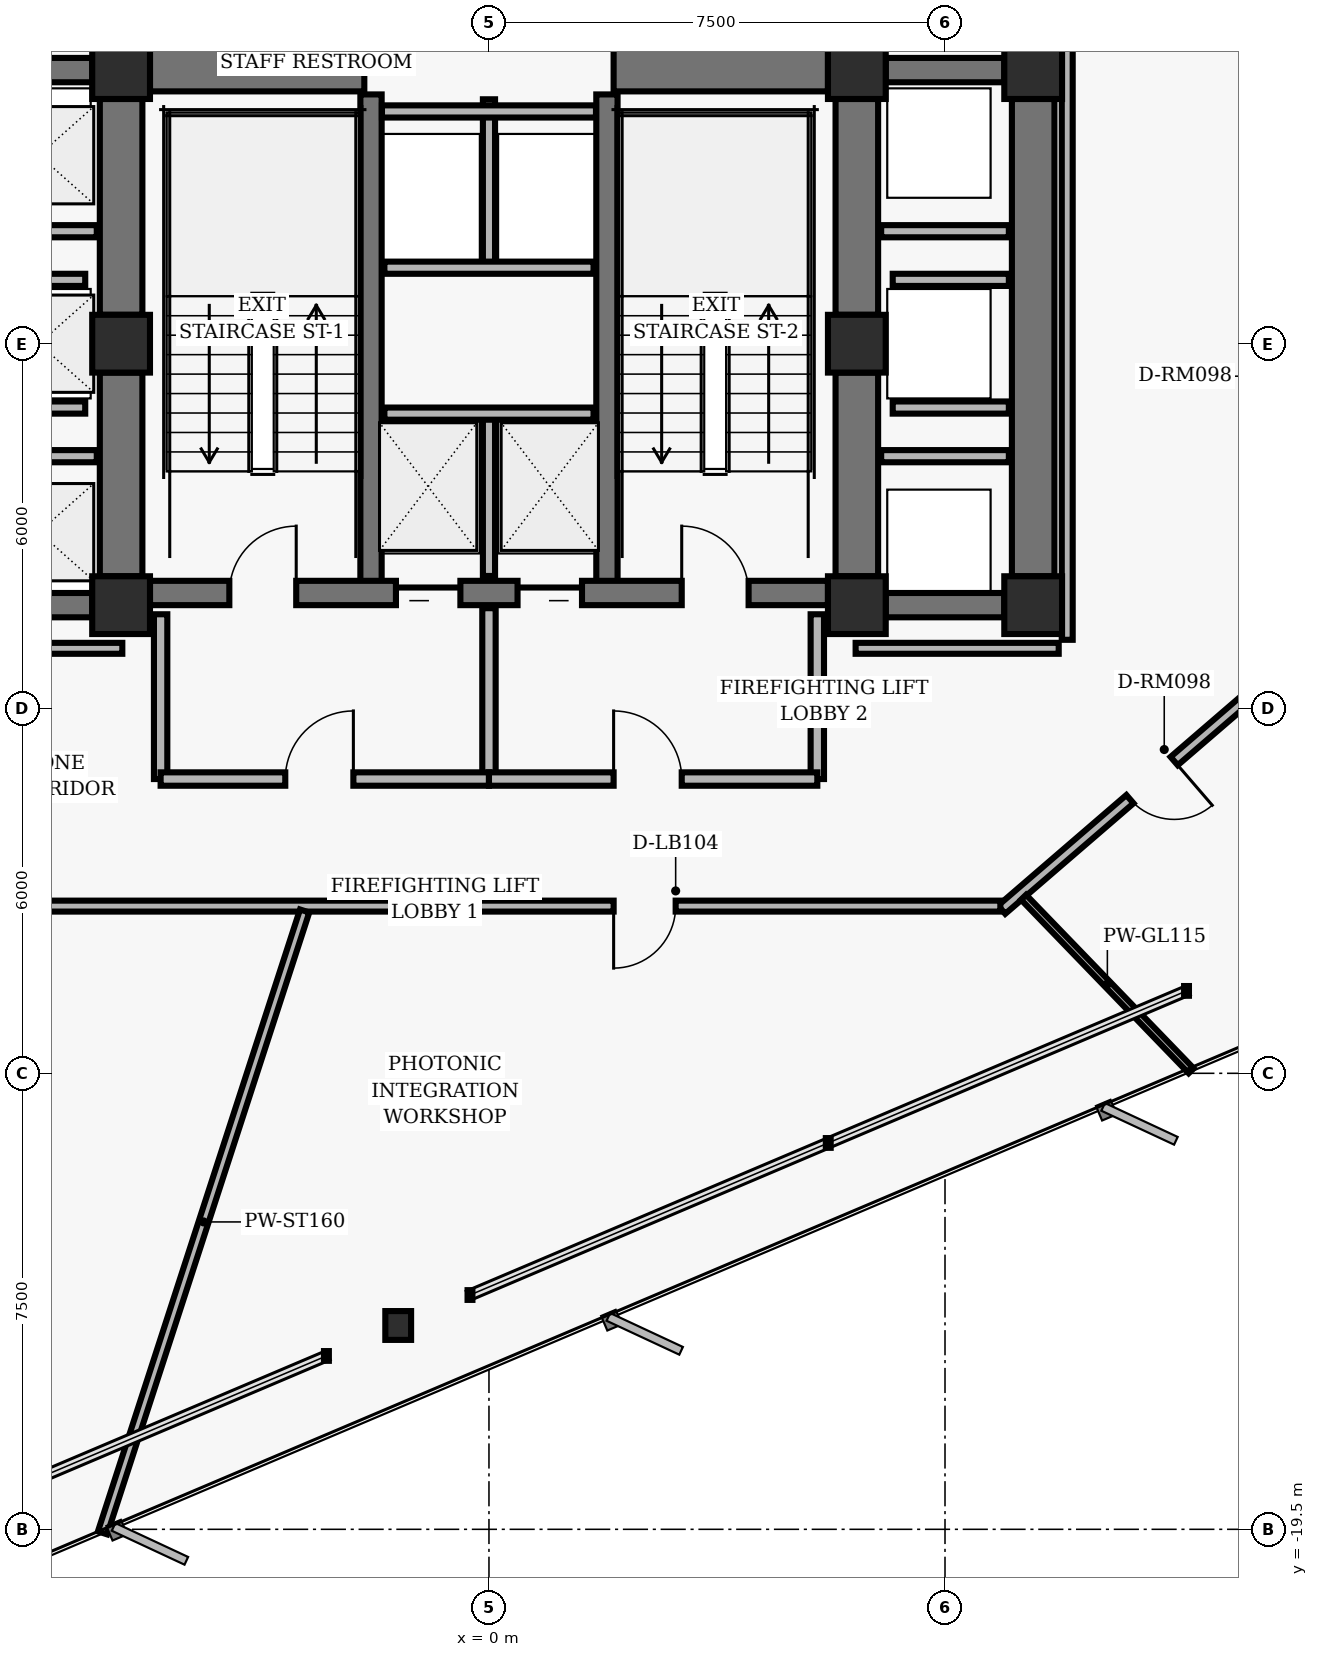
"""IFC4 building model, lengths in metres.
Left out: names, types, materials, properties, quantities, classifications, styles, units other than length and angle.
Written with IfcOpenShell. Run it as: python <this file> out.ifc"""

import sys

from ifc_helpers import new_model, si_unit, direction, frame, frame_2d, origin, origin_2d, place, context, subcontext, project, spatial, rectangle, hollow_rectangle, i_section, extrude, element, fill, save


model = new_model("IFC4")
c1 = context("Model", 3, precision=1e-05, world=origin(), true_north=direction((0.0, 1.0)))
c2 = subcontext(c1, "Body", "Model", "MODEL_VIEW")
j1 = project(units=[si_unit("LENGTHUNIT", "METRE"), si_unit("PLANEANGLEUNIT", "RADIAN")], contexts=[c1])
p1 = place(None, origin())
s1 = spatial("IfcSite", under=j1, at=p1, CompositionType="ELEMENT")
p2 = place(p1, origin())
s2 = spatial("IfcBuilding", under=s1, at=p2, CompositionType="ELEMENT")
p3 = place(p2, frame((0.0, 0.0, 56.32)))
s3 = spatial("IfcBuildingStorey", under=s2, at=p3, CompositionType="ELEMENT", Elevation=56.32)
for number, where, z_axis, x_axis in (
    (1, (-6.05, 4.5, 0.0), (0.0, 0.0, 1.0), (1.0, 0.0, 0.0)),
    (2, (6.05, 4.5, 0.0), (0.0, 0.0, 1.0), (1.0, 0.0, 0.0)),
    (3, (-6.05, 0.0, 0.0), (0.0, 0.0, 1.0), (1.0, 0.0, 0.0)),
    (4, (6.05, 0.0, 0.0), (0.0, 0.0, 1.0), (1.0, 0.0, 0.0)),
    (5, (-6.05, -4.3, 0.0), (0.0, 0.0, 1.0), (1.0, 0.0, 0.0)),
    (6, (6.05, -4.3, 0.0), (0.0, 0.0, 1.0), (1.0, 0.0, 0.0)),
    (7, (8.95, 4.5, 0.0), (0.0, 0.0, 1.0), (1.0, 0.0, 0.0)),
    (8, (8.95, -4.3, 0.0), (0.0, 0.0, 1.0), (1.0, 0.0, 0.0)),
):
    element("IfcColumn", number, at=place(p3, frame(where, z_axis=z_axis, x_axis=x_axis)), inside=s3, PredefinedType="COLUMN", context=c2, shape_type="SweptSolid", body=[
        extrude(hollow_rectangle(XDim=0.95, YDim=0.95, WallThickness=0.06, InnerFilletRadius=0.02, OuterFilletRadius=0.04, at=origin_2d()), origin(), (0.0, 0.0, 1.0), 3.36),
    ])
p4 = place(p3, frame((-6.05, 0.475, 0.0), z_axis=(0.0, 0.0, 1.0), x_axis=(0.0, 1.0, 0.0)))
e9 = element("IfcWall", 9, at=p4, inside=s3, PredefinedType="SHEAR", context=c2, shape_type="SweptSolid", body=[
    extrude(rectangle(XDim=3.55, YDim=0.7, at=frame_2d((1.775, 0.0))), origin(), (0.0, 0.0, 1.0), 3.098),
])
p5 = place(p3, frame((-6.05, -3.825, 0.0), z_axis=(0.0, 0.0, 1.0), x_axis=(0.0, 1.0, 0.0)))
e10 = element("IfcWall", 10, at=p5, inside=s3, PredefinedType="SHEAR", context=c2, shape_type="SweptSolid", body=[
    extrude(rectangle(XDim=3.35, YDim=0.7, at=frame_2d((1.675, 0.0))), origin(), (0.0, 0.0, 1.0), 3.098),
])
p6 = place(p3, frame((6.05, 0.475, 0.0), z_axis=(0.0, 0.0, 1.0), x_axis=(0.0, 1.0, 0.0)))
e11 = element("IfcWall", 11, at=p6, inside=s3, PredefinedType="SHEAR", context=c2, shape_type="SweptSolid", body=[
    extrude(rectangle(XDim=3.55, YDim=0.7, at=frame_2d((1.775, 0.0))), origin(), (0.0, 0.0, 1.0), 3.098),
])
p7 = place(p3, frame((6.05, -3.825, 0.0), z_axis=(0.0, 0.0, 1.0), x_axis=(0.0, 1.0, 0.0)))
e12 = element("IfcWall", 12, at=p7, inside=s3, PredefinedType="SHEAR", context=c2, shape_type="SweptSolid", body=[
    extrude(rectangle(XDim=3.35, YDim=0.7, at=frame_2d((1.675, 0.0))), origin(), (0.0, 0.0, 1.0), 3.098),
])
for number, where, z_axis, x_axis in (
    (13, (-1.94, -4.1, 0.0), (0.0, 0.0, 1.0), (0.0, 1.0, 0.0)),
    (14, (1.94, -4.1, 0.0), (0.0, 0.0, 1.0), (0.0, 1.0, 0.0)),
):
    element("IfcWall", number, at=place(p3, frame(where, z_axis=z_axis, x_axis=x_axis)), inside=s3, PredefinedType="SHEAR", context=c2, shape_type="SweptSolid", body=[
        extrude(rectangle(XDim=8.2, YDim=0.35, at=frame_2d((4.1, 0.0))), origin(), (0.0, 0.0, 1.0), 3.098),
    ])
p8 = place(p3, frame((-5.575, -4.1, 0.0), z_axis=(0.0, 0.0, 1.0), x_axis=(1.0, 0.0, 0.0)))
e15 = element("IfcWall", 15, at=p8, inside=s3, PredefinedType="SHEAR", context=c2, shape_type="SweptSolid", body=[
    extrude(rectangle(XDim=11.15, YDim=0.4, at=frame_2d((5.575, 0.0))), origin(), (0.0, 0.0, 1.0), 3.098),
])
p9 = place(p8, frame((1.305, 0.0, 0.0)))
e16 = element("IfcOpeningElement", 16, at=p9, cuts=e15, PredefinedType="OPENING", context=c2, shape_type="SweptSolid", body=[
    extrude(rectangle(XDim=1.1, YDim=2.04, at=frame_2d((0.55, 1.02))), frame((0.0, 0.21, 0.0), z_axis=(0.0, -1.0, 0.0), x_axis=(1.0, 0.0, 0.0)), (0.0, 0.0, 1.0), 0.42),
])
p10 = place(p8, frame((8.745, 0.0, 0.0)))
e17 = element("IfcOpeningElement", 17, at=p10, cuts=e15, PredefinedType="OPENING", context=c2, shape_type="SweptSolid", body=[
    extrude(rectangle(XDim=1.1, YDim=2.04, at=frame_2d((0.55, 1.02))), frame((0.0, 0.21, 0.0), z_axis=(0.0, -1.0, 0.0), x_axis=(1.0, 0.0, 0.0)), (0.0, 0.0, 1.0), 0.42),
])
p11 = place(p8, frame((4.045, 0.0, 0.0)))
e18 = element("IfcOpeningElement", 18, at=p11, cuts=e15, PredefinedType="OPENING", context=c2, shape_type="SweptSolid", body=[
    extrude(rectangle(XDim=1.06, YDim=2.04, at=frame_2d((0.53, 1.02))), frame((0.0, 0.21, 0.0), z_axis=(0.0, -1.0, 0.0), x_axis=(1.0, 0.0, 0.0)), (0.0, 0.0, 1.0), 0.42),
])
p12 = place(p8, frame((6.045, 0.0, 0.0)))
e19 = element("IfcOpeningElement", 19, at=p12, cuts=e15, PredefinedType="OPENING", context=c2, shape_type="SweptSolid", body=[
    extrude(rectangle(XDim=1.06, YDim=2.04, at=frame_2d((0.53, 1.02))), frame((0.0, 0.21, 0.0), z_axis=(0.0, -1.0, 0.0), x_axis=(1.0, 0.0, 0.0)), (0.0, 0.0, 1.0), 0.42),
])
for number, where, z_axis, x_axis in (
    (20, (-5.575, 4.5, 0.0), (0.0, 0.0, 1.0), (1.0, 0.0, 0.0)),
    (21, (2.05, 4.5, 0.0), (0.0, 0.0, 1.0), (1.0, 0.0, 0.0)),
):
    element("IfcWall", number, at=place(p3, frame(where, z_axis=z_axis, x_axis=x_axis)), inside=s3, PredefinedType="SHEAR", context=c2, shape_type="SweptSolid", body=[
        extrude(rectangle(XDim=3.525, YDim=0.7, at=frame_2d((1.762, 0.0))), origin(), (0.0, 0.0, 1.0), 3.098),
    ])
for number, where, z_axis, x_axis in (
    (22, (-8.475, 4.5, 0.0), (0.0, 0.0, 1.0), (1.0, 0.0, 0.0)),
    (23, (-8.475, -4.3, 0.0), (0.0, 0.0, 1.0), (1.0, 0.0, 0.0)),
):
    element("IfcWall", number, at=place(p3, frame(where, z_axis=z_axis, x_axis=x_axis)), inside=s3, PredefinedType="SHEAR", context=c2, shape_type="SweptSolid", body=[
        extrude(rectangle(XDim=1.95, YDim=0.4, at=frame_2d((0.975, 0.0))), origin(), (0.0, 0.0, 1.0), 3.098),
    ])
p13 = place(p3, frame((8.95, -3.825, 0.0), z_axis=(0.0, 0.0, 1.0), x_axis=(0.0, 1.0, 0.0)))
e24 = element("IfcWall", 24, at=p13, inside=s3, PredefinedType="SHEAR", context=c2, shape_type="SweptSolid", body=[
    extrude(rectangle(XDim=7.85, YDim=0.7, at=frame_2d((3.925, 0.0))), origin(), (0.0, 0.0, 1.0), 3.098),
])
for number, where, z_axis, x_axis in (
    (25, (6.525, 4.5, 0.0), (0.0, 0.0, 1.0), (1.0, 0.0, 0.0)),
    (26, (6.525, -4.3, 0.0), (0.0, 0.0, 1.0), (1.0, 0.0, 0.0)),
):
    element("IfcWall", number, at=place(p3, frame(where, z_axis=z_axis, x_axis=x_axis)), inside=s3, PredefinedType="SHEAR", context=c2, shape_type="SweptSolid", body=[
        extrude(rectangle(XDim=1.95, YDim=0.4, at=frame_2d((0.975, 0.0))), origin(), (0.0, 0.0, 1.0), 3.098),
    ])
p14 = place(p3, frame((-1.493, -16.148, 0.0), z_axis=(0.0, 0.0, 1.0), x_axis=(1.0, 0.0, 0.0)))
e27 = element("IfcColumn", 27, at=p14, inside=s3, PredefinedType="COLUMN", context=c2, shape_type="SweptSolid", body=[
    extrude(i_section(OverallWidth=0.424, OverallDepth=0.474, WebThickness=0.048, FlangeThickness=0.077, FilletRadius=0.025, at=origin_2d()), origin(), (0.0, 0.0, 1.0), 3.36),
])
p15 = place(p3, frame((0.0, -3.82, 0.0), z_axis=(0.0, 0.0, 1.0), x_axis=(0.0, 1.0, 0.0)))
e28 = element("IfcWall", 28, at=p15, inside=s3, PredefinedType="PARTITIONING", context=c2, shape_type="SweptSolid", body=[
    extrude(rectangle(XDim=2.67, YDim=0.2, at=frame_2d((1.335, 0.0))), origin(), (0.0, 0.0, 1.0), 3.073),
])
p16 = place(p3, frame((-1.72, -1.15, 0.0), z_axis=(0.0, 0.0, 1.0), x_axis=(1.0, 0.0, 0.0)))
e29 = element("IfcWall", 29, at=p16, inside=s3, PredefinedType="PARTITIONING", context=c2, shape_type="SweptSolid", body=[
    extrude(rectangle(XDim=3.44, YDim=0.2, at=frame_2d((1.72, 0.0))), origin(), (0.0, 0.0, 1.0), 3.073),
])
for number, where, z_axis, x_axis in (
    (30, (-5.4, -7.16, 0.0), (0.0, 0.0, 1.0), (0.0, 1.0, 0.0)),
    (31, (5.4, -7.16, 0.0), (0.0, 0.0, 1.0), (0.0, 1.0, 0.0)),
):
    element("IfcWall", number, at=place(p3, frame(where, z_axis=z_axis, x_axis=x_axis)), inside=s3, PredefinedType="PARTITIONING", context=c2, shape_type="SweptSolid", body=[
        extrude(rectangle(XDim=2.71, YDim=0.22, at=frame_2d((1.355, 0.0))), origin(), (0.0, 0.0, 1.0), 3.073),
    ])
p17 = place(p3, frame((0.0, -7.16, 0.0), z_axis=(0.0, 0.0, 1.0), x_axis=(0.0, 1.0, 0.0)))
e32 = element("IfcWall", 32, at=p17, inside=s3, PredefinedType="PARTITIONING", context=c2, shape_type="SweptSolid", body=[
    extrude(rectangle(XDim=2.81, YDim=0.22, at=frame_2d((1.405, 0.0))), origin(), (0.0, 0.0, 1.0), 3.073),
])
p18 = place(p3, frame((-5.4, -7.16, 0.0), z_axis=(0.0, 0.0, 1.0), x_axis=(1.0, 0.0, 0.0)))
e33 = element("IfcWall", 33, at=p18, inside=s3, PredefinedType="PARTITIONING", context=c2, shape_type="SweptSolid", body=[
    extrude(rectangle(XDim=5.4, YDim=0.22, at=frame_2d((2.7, 0.0))), origin(), (0.0, 0.0, 1.0), 2.587),
])
p19 = place(p18, frame((2.05, 0.0, 0.0)))
e34 = element("IfcOpeningElement", 34, at=p19, cuts=e33, PredefinedType="OPENING", context=c2, shape_type="SweptSolid", body=[
    extrude(rectangle(XDim=1.12, YDim=2.02, at=frame_2d((0.56, 1.01))), frame((0.0, 0.12, 0.0), z_axis=(0.0, -1.0, 0.0), x_axis=(1.0, 0.0, 0.0)), (0.0, 0.0, 1.0), 0.24),
])
p20 = place(p3, frame((0.0, -7.16, 0.0), z_axis=(0.0, 0.0, 1.0), x_axis=(1.0, 0.0, 0.0)))
e35 = element("IfcWall", 35, at=p20, inside=s3, PredefinedType="PARTITIONING", context=c2, shape_type="SweptSolid", body=[
    extrude(rectangle(XDim=5.4, YDim=0.22, at=frame_2d((2.7, 0.0))), origin(), (0.0, 0.0, 1.0), 2.587),
])
p21 = place(p20, frame((2.05, 0.0, 0.0)))
e36 = element("IfcOpeningElement", 36, at=p21, cuts=e35, PredefinedType="OPENING", context=c2, shape_type="SweptSolid", body=[
    extrude(rectangle(XDim=1.12, YDim=2.02, at=frame_2d((0.56, 1.01))), frame((0.0, 0.12, 0.0), z_axis=(0.0, -1.0, 0.0), x_axis=(1.0, 0.0, 0.0)), (0.0, 0.0, 1.0), 0.24),
])
p22 = place(p3, frame((0.0, 1.25, 0.0), z_axis=(0.0, 0.0, 1.0), x_axis=(0.0, 1.0, 0.0)))
e37 = element("IfcWall", 37, at=p22, inside=s3, PredefinedType="PARTITIONING", context=c2, shape_type="SweptSolid", body=[
    extrude(rectangle(XDim=2.77, YDim=0.2, at=frame_2d((1.385, 0.0))), origin(), (0.0, 0.0, 1.0), 3.073),
])
p23 = place(p3, frame((-1.72, 1.25, 0.0), z_axis=(0.0, 0.0, 1.0), x_axis=(1.0, 0.0, 0.0)))
e38 = element("IfcWall", 38, at=p23, inside=s3, PredefinedType="PARTITIONING", context=c2, shape_type="SweptSolid", body=[
    extrude(rectangle(XDim=3.44, YDim=0.2, at=frame_2d((1.72, 0.0))), origin(), (0.0, 0.0, 1.0), 3.073),
])
p24 = place(p3, frame((-1.76, 3.82, 0.0), z_axis=(0.0, 0.0, 1.0), x_axis=(1.0, 0.0, 0.0)))
e39 = element("IfcWall", 39, at=p24, inside=s3, PredefinedType="PARTITIONING", context=c2, shape_type="SweptSolid", body=[
    extrude(rectangle(XDim=3.52, YDim=0.2, at=frame_2d((1.76, 0.0))), origin(), (0.0, 0.0, 1.0), 3.073),
])
for number, where, z_axis, x_axis in (
    (40, (-8.55, -1.85, 0.0), (0.0, 0.0, 1.0), (1.0, 0.0, 0.0)),
    (41, (-8.55, 1.85, 0.0), (0.0, 0.0, 1.0), (1.0, 0.0, 0.0)),
):
    element("IfcWall", number, at=place(p3, frame(where, z_axis=z_axis, x_axis=x_axis)), inside=s3, PredefinedType="PARTITIONING", context=c2, shape_type="SweptSolid", body=[
        extrude(rectangle(XDim=2.1, YDim=0.2, at=frame_2d((1.05, 0.0))), origin(), (0.0, 0.0, 1.0), 3.073),
    ])
for number, where, z_axis, x_axis in (
    (42, (-8.55, -1.05, 0.0), (0.0, 0.0, 1.0), (1.0, 0.0, 0.0)),
    (43, (-8.55, 1.05, 0.0), (0.0, 0.0, 1.0), (1.0, 0.0, 0.0)),
):
    element("IfcWall", number, at=place(p3, frame(where, z_axis=z_axis, x_axis=x_axis)), inside=s3, PredefinedType="PARTITIONING", context=c2, shape_type="SweptSolid", body=[
        extrude(rectangle(XDim=1.91, YDim=0.2, at=frame_2d((0.955, 0.0))), origin(), (0.0, 0.0, 1.0), 3.073),
    ])
for number, where, z_axis, x_axis in (
    (44, (6.45, -1.85, 0.0), (0.0, 0.0, 1.0), (1.0, 0.0, 0.0)),
    (45, (6.45, 1.85, 0.0), (0.0, 0.0, 1.0), (1.0, 0.0, 0.0)),
):
    element("IfcWall", number, at=place(p3, frame(where, z_axis=z_axis, x_axis=x_axis)), inside=s3, PredefinedType="PARTITIONING", context=c2, shape_type="SweptSolid", body=[
        extrude(rectangle(XDim=2.1, YDim=0.2, at=frame_2d((1.05, 0.0))), origin(), (0.0, 0.0, 1.0), 3.073),
    ])
for number, where, z_axis, x_axis in (
    (46, (6.64, -1.05, 0.0), (0.0, 0.0, 1.0), (1.0, 0.0, 0.0)),
    (47, (6.64, 1.05, 0.0), (0.0, 0.0, 1.0), (1.0, 0.0, 0.0)),
):
    element("IfcWall", number, at=place(p3, frame(where, z_axis=z_axis, x_axis=x_axis)), inside=s3, PredefinedType="PARTITIONING", context=c2, shape_type="SweptSolid", body=[
        extrude(rectangle(XDim=1.91, YDim=0.2, at=frame_2d((0.955, 0.0))), origin(), (0.0, 0.0, 1.0), 3.073),
    ])
p25 = place(p3, frame((13.268, -5.141, 0.0), z_axis=(0.0, 0.0, 1.0), x_axis=(-0.757534501725, -0.65279512766, 0.0)))
e48 = element("IfcWall", 48, at=p25, inside=s3, PredefinedType="PARTITIONING", context=c2, shape_type="SweptSolid", body=[
    extrude(rectangle(XDim=6.385, YDim=0.18, at=frame_2d((3.192, 0.0))), origin(), (0.0, 0.0, 1.0), 3.073),
])
p26 = place(p25, frame((2.639, 0.0, 0.0)))
e49 = element("IfcOpeningElement", 49, at=p26, cuts=e48, PredefinedType="OPENING", context=c2, shape_type="SweptSolid", body=[
    extrude(rectangle(XDim=0.96, YDim=2.02, at=frame_2d((0.48, 1.01))), frame((0.0, 0.1, 0.0), z_axis=(0.0, -1.0, 0.0), x_axis=(1.0, 0.0, 0.0)), (0.0, 0.0, 1.0), 0.2),
])
p27 = place(p3, frame((8.41, -9.25, 0.0), z_axis=(0.0, 0.0, 1.0), x_axis=(-1.0, 0.0, 0.0)))
e50 = element("IfcWall", 50, at=p27, inside=s3, PredefinedType="PARTITIONING", context=c2, shape_type="SweptSolid", body=[
    extrude(rectangle(XDim=17.0, YDim=0.18, at=frame_2d((8.5, 0.0))), origin(), (0.0, 0.0, 1.0), 2.587),
])
p28 = place(p27, frame((5.34, 0.0, 0.0)))
e51 = element("IfcOpeningElement", 51, at=p28, cuts=e50, PredefinedType="OPENING", context=c2, shape_type="SweptSolid", body=[
    extrude(rectangle(XDim=1.02, YDim=2.02, at=frame_2d((0.51, 1.01))), frame((0.0, 0.1, 0.0), z_axis=(0.0, -1.0, 0.0), x_axis=(1.0, 0.0, 0.0)), (0.0, 0.0, 1.0), 0.2),
])
for number, where, z_axis, x_axis in (
    (52, (-9.37, -5.01, 0.0), (0.0, 0.0, 1.0), (1.0, 0.0, 0.0)),
    (53, (6.03, -5.01, 0.0), (0.0, 0.0, 1.0), (1.0, 0.0, 0.0)),
):
    element("IfcWall", number, at=place(p3, frame(where, z_axis=z_axis, x_axis=x_axis)), inside=s3, PredefinedType="PARTITIONING", context=c2, shape_type="SweptSolid", body=[
        extrude(rectangle(XDim=3.34, YDim=0.18, at=frame_2d((1.67, 0.0))), origin(), (0.0, 0.0, 1.0), 3.073),
    ])
p29 = place(p3, frame((9.51, -4.87, 0.0), z_axis=(0.0, 0.0, 1.0), x_axis=(0.0, 1.0, 0.0)))
e54 = element("IfcWall", 54, at=p29, inside=s3, PredefinedType="PARTITIONING", context=c2, shape_type="SweptSolid", body=[
    extrude(rectangle(XDim=9.74, YDim=0.18, at=frame_2d((4.87, 0.0))), origin(), (0.0, 0.0, 1.0), 3.073),
])
p30 = place(p3, frame((-3.031, -9.33, 0.0), z_axis=(0.0, 0.0, 1.0), x_axis=(-0.309020370084, -0.951055419454, 0.0)))
e55 = element("IfcWall", 55, at=p30, inside=s3, PredefinedType="PARTITIONING", context=c2, shape_type="SweptSolid", body=[
    extrude(rectangle(XDim=10.755, YDim=0.16, at=frame_2d((5.377, 0.0))), origin(), (0.0, 0.0, 1.0), 3.073),
])
p31 = place(p3, frame((8.792, -9.104, 0.0), z_axis=(0.0, 0.0, 1.0), x_axis=(0.694664773763, -0.719333616685, 0.0)))
e56 = element("IfcWall", 56, at=p31, inside=s3, PredefinedType="MOVABLE", context=c2, shape_type="SweptSolid", body=[
    extrude(rectangle(XDim=3.969, YDim=0.115, at=frame_2d((1.984, 0.0))), origin(), (0.0, 0.0, 1.0), 3.073),
])
p32 = place(p9, origin())
e57 = element("IfcDoor", 57, at=p32, inside=s3, OperationType="SINGLE_SWING_RIGHT", PredefinedType="DOOR", context=c2, shape_type="SweptSolid", body=[
    extrude(rectangle(XDim=1.1, YDim=2.04, at=frame_2d((0.55, 1.02))), frame((0.0, 0.025, 0.0), z_axis=(0.0, -1.0, 0.0), x_axis=(1.0, 0.0, 0.0)), (0.0, 0.0, 1.0), 0.05),
])
fill(e16, e57)
p33 = place(p10, origin())
e58 = element("IfcDoor", 58, at=p33, inside=s3, OperationType="SINGLE_SWING_LEFT", PredefinedType="DOOR", context=c2, shape_type="SweptSolid", body=[
    extrude(rectangle(XDim=1.1, YDim=2.04, at=frame_2d((0.55, 1.02))), frame((0.0, 0.025, 0.0), z_axis=(0.0, -1.0, 0.0), x_axis=(1.0, 0.0, 0.0)), (0.0, 0.0, 1.0), 0.05),
])
fill(e17, e58)
p34 = place(p11, origin())
e59 = element("IfcDoor", 59, at=p34, inside=s3, OperationType="SLIDING_TO_LEFT", PredefinedType="DOOR", context=c2, shape_type="SweptSolid", body=[
    extrude(rectangle(XDim=1.06, YDim=2.04, at=frame_2d((0.53, 1.02))), frame((0.0, 0.025, 0.0), z_axis=(0.0, -1.0, 0.0), x_axis=(1.0, 0.0, 0.0)), (0.0, 0.0, 1.0), 0.05),
])
fill(e18, e59)
p35 = place(p12, origin())
e60 = element("IfcDoor", 60, at=p35, inside=s3, OperationType="SLIDING_TO_RIGHT", PredefinedType="DOOR", context=c2, shape_type="SweptSolid", body=[
    extrude(rectangle(XDim=1.06, YDim=2.04, at=frame_2d((0.53, 1.02))), frame((0.0, 0.025, 0.0), z_axis=(0.0, -1.0, 0.0), x_axis=(1.0, 0.0, 0.0)), (0.0, 0.0, 1.0), 0.05),
])
fill(e19, e60)
p36 = place(p19, origin())
e61 = element("IfcDoor", 61, at=p36, inside=s3, OperationType="SINGLE_SWING_RIGHT", PredefinedType="DOOR", context=c2, shape_type="SweptSolid", body=[
    extrude(rectangle(XDim=1.12, YDim=2.02, at=frame_2d((0.56, 1.01))), frame((0.0, 0.025, 0.0), z_axis=(0.0, -1.0, 0.0), x_axis=(1.0, 0.0, 0.0)), (0.0, 0.0, 1.0), 0.05),
])
fill(e34, e61)
p37 = place(p21, origin())
e62 = element("IfcDoor", 62, at=p37, inside=s3, OperationType="SINGLE_SWING_LEFT", PredefinedType="DOOR", context=c2, shape_type="SweptSolid", body=[
    extrude(rectangle(XDim=1.12, YDim=2.02, at=frame_2d((0.56, 1.01))), frame((0.0, 0.025, 0.0), z_axis=(0.0, -1.0, 0.0), x_axis=(1.0, 0.0, 0.0)), (0.0, 0.0, 1.0), 0.05),
])
fill(e36, e62)
p38 = place(p28, origin())
e63 = element("IfcDoor", 63, at=p38, inside=s3, OperationType="SINGLE_SWING_RIGHT", PredefinedType="DOOR", context=c2, shape_type="SweptSolid", body=[
    extrude(rectangle(XDim=1.02, YDim=2.02, at=frame_2d((0.51, 1.01))), frame((0.0, 0.025, 0.0), z_axis=(0.0, -1.0, 0.0), x_axis=(1.0, 0.0, 0.0)), (0.0, 0.0, 1.0), 0.05),
])
fill(e51, e63)
p39 = place(p26, origin())
e64 = element("IfcDoor", 64, at=p39, inside=s3, OperationType="SINGLE_SWING_LEFT", PredefinedType="DOOR", context=c2, shape_type="SweptSolid", body=[
    extrude(rectangle(XDim=0.96, YDim=2.02, at=frame_2d((0.48, 1.01))), frame((0.0, 0.025, 0.0), z_axis=(0.0, -1.0, 0.0), x_axis=(1.0, 0.0, 0.0)), (0.0, 0.0, 1.0), 0.05),
])
fill(e49, e64)
save(model, sys.argv[1])
